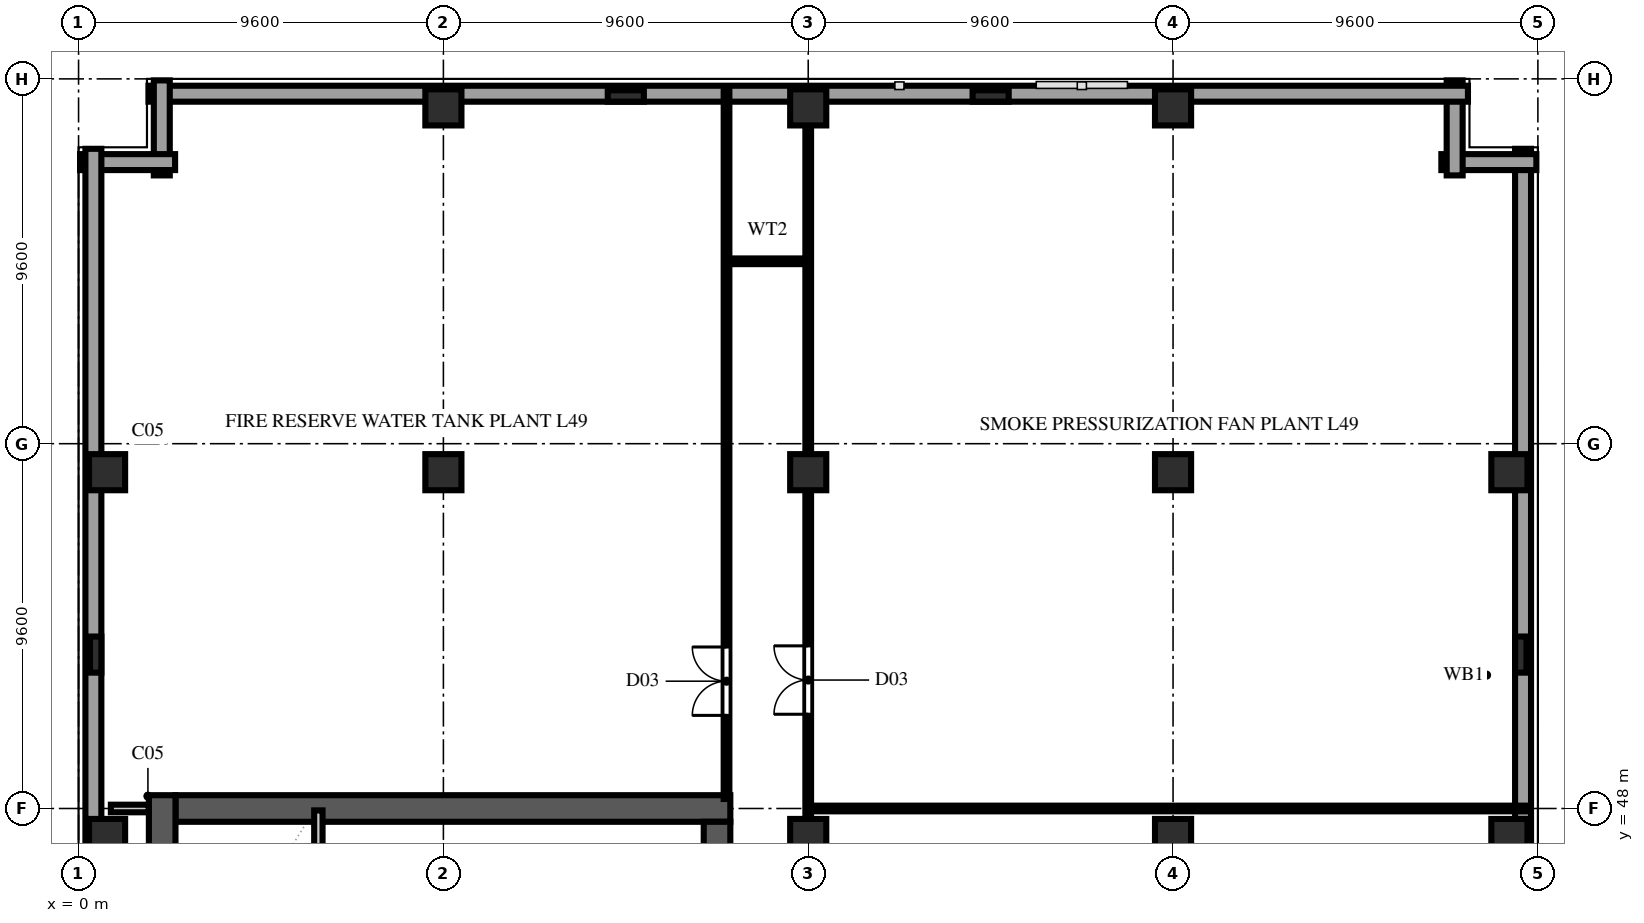
"""IFC4 building model, lengths in metres.
Left out: names, types, materials, properties, quantities, classifications, styles, units other than length and angle.
Written with IfcOpenShell. Run it as: python <this file> out.ifc"""

import sys

from ifc_helpers import new_model, si_unit, direction, frame, frame_2d, origin, origin_2d, place, context, subcontext, project, spatial, rectangle, extrude, element, fill, save


model = new_model("IFC4")
c1 = context("Model", 3, precision=1e-05, world=origin(), true_north=direction((0.0, 1.0)))
c2 = subcontext(c1, "Body", "Model", "MODEL_VIEW")
j1 = project(units=[si_unit("LENGTHUNIT", "METRE"), si_unit("PLANEANGLEUNIT", "RADIAN")], contexts=[c1])
p1 = place(None, origin())
s1 = spatial("IfcSite", under=j1, at=p1, CompositionType="ELEMENT")
p2 = place(p1, origin())
s2 = spatial("IfcBuilding", under=s1, at=p2, CompositionType="ELEMENT")
p3 = place(p2, frame((0.0, 0.0, 194.0)))
s3 = spatial("IfcBuildingStorey", under=s2, at=p3, CompositionType="ELEMENT", Elevation=194.0)
p4 = place(p3, frame((2.55, 48.0, 0.0), z_axis=(0.0, 0.0, 1.0), x_axis=(1.0, 0.0, 0.0)))
e1 = element("IfcWall", 1, at=p4, inside=s3, PredefinedType="SHEAR", context=c2, shape_type="SweptSolid", body=[
    extrude(rectangle(XDim=14.6, YDim=0.7, at=frame_2d((7.3, 0.0))), origin(), (0.0, 0.0, 1.0), 4.74),
])
p5 = place(p3, frame((2.2, 9.25, 0.0), z_axis=(0.0, 0.0, 1.0), x_axis=(0.0, 1.0, 0.0)))
e2 = element("IfcWall", 2, at=p5, inside=s3, PredefinedType="SHEAR", context=c2, shape_type="SweptSolid", body=[
    extrude(rectangle(XDim=39.1, YDim=0.7, at=frame_2d((19.55, 0.0))), origin(), (0.0, 0.0, 1.0), 4.74),
])
p6 = place(p3, frame((16.8, 36.4, 0.0), z_axis=(0.0, 0.0, 1.0), x_axis=(0.0, 1.0, 0.0)))
e3 = element("IfcWall", 3, at=p6, inside=s3, PredefinedType="SHEAR", context=c2, shape_type="SweptSolid", body=[
    extrude(rectangle(XDim=11.25, YDim=0.7, at=frame_2d((5.625, 0.0))), origin(), (0.0, 0.0, 1.0), 4.74),
])
p7 = place(p6, frame((9.2, 0.0, 0.0)))
e4 = element("IfcOpeningElement", 4, at=p7, cuts=e3, PredefinedType="OPENING", context=c2, shape_type="SweptSolid", body=[
    extrude(rectangle(XDim=0.95, YDim=2.15, at=frame_2d((0.475, 1.075))), frame((0.0, 0.362, 0.0), z_axis=(0.0, -1.0, 0.0), x_axis=(1.0, 0.0, 0.0)), (0.0, 0.0, 1.0), 0.724),
])
for number, where, z_axis, x_axis in (
    (5, (0.75, 47.25, 0.0), (0.0, 0.0, 1.0), (1.0, 0.0, 0.0)),
    (6, (0.75, 56.85, 0.0), (0.0, 0.0, 1.0), (1.0, 0.0, 0.0)),
    (7, (9.6, 56.85, 0.0), (0.0, 0.0, 1.0), (1.0, 0.0, 0.0)),
):
    element("IfcColumn", number, at=place(p3, frame(where, z_axis=z_axis, x_axis=x_axis)), inside=s3, PredefinedType="COLUMN", context=c2, shape_type="SweptSolid", body=[
        extrude(rectangle(XDim=0.95, YDim=0.95, at=origin_2d()), origin(), (0.0, 0.0, 1.0), 5.0),
    ])
p8 = place(p3, frame((9.6, 66.45, 0.0), z_axis=(0.0, 0.0, 1.0), x_axis=(1.0, 0.0, 0.0)))
e8 = element("IfcColumn", 8, at=p8, inside=s3, PredefinedType="COLUMN", context=c2, shape_type="SweptSolid", body=[
    extrude(rectangle(XDim=0.95, YDim=0.95, at=origin_2d()), origin(), (0.0, 0.0, 1.0), 4.7),
])
for number, where, z_axis, x_axis in (
    (9, (19.2, 47.25, 0.0), (0.0, 0.0, 1.0), (1.0, 0.0, 0.0)),
    (10, (19.2, 56.85, 0.0), (0.0, 0.0, 1.0), (1.0, 0.0, 0.0)),
):
    element("IfcColumn", number, at=place(p3, frame(where, z_axis=z_axis, x_axis=x_axis)), inside=s3, PredefinedType="COLUMN", context=c2, shape_type="SweptSolid", body=[
        extrude(rectangle(XDim=0.95, YDim=0.95, at=origin_2d()), origin(), (0.0, 0.0, 1.0), 5.0),
    ])
p9 = place(p3, frame((19.2, 66.45, 0.0), z_axis=(0.0, 0.0, 1.0), x_axis=(1.0, 0.0, 0.0)))
e11 = element("IfcColumn", 11, at=p9, inside=s3, PredefinedType="COLUMN", context=c2, shape_type="SweptSolid", body=[
    extrude(rectangle(XDim=0.95, YDim=0.95, at=origin_2d()), origin(), (0.0, 0.0, 1.0), 4.7),
])
for number, where, z_axis, x_axis in (
    (12, (28.8, 47.25, 0.0), (0.0, 0.0, 1.0), (1.0, 0.0, 0.0)),
    (13, (28.8, 56.85, 0.0), (0.0, 0.0, 1.0), (1.0, 0.0, 0.0)),
):
    element("IfcColumn", number, at=place(p3, frame(where, z_axis=z_axis, x_axis=x_axis)), inside=s3, PredefinedType="COLUMN", context=c2, shape_type="SweptSolid", body=[
        extrude(rectangle(XDim=0.95, YDim=0.95, at=origin_2d()), origin(), (0.0, 0.0, 1.0), 5.0),
    ])
p10 = place(p3, frame((28.8, 66.45, 0.0), z_axis=(0.0, 0.0, 1.0), x_axis=(1.0, 0.0, 0.0)))
e14 = element("IfcColumn", 14, at=p10, inside=s3, PredefinedType="COLUMN", context=c2, shape_type="SweptSolid", body=[
    extrude(rectangle(XDim=0.95, YDim=0.95, at=origin_2d()), origin(), (0.0, 0.0, 1.0), 4.7),
])
for number, where, z_axis, x_axis in (
    (15, (37.65, 47.25, 0.0), (0.0, 0.0, 1.0), (1.0, 0.0, 0.0)),
    (16, (37.65, 56.85, 0.0), (0.0, 0.0, 1.0), (1.0, 0.0, 0.0)),
):
    element("IfcColumn", number, at=place(p3, frame(where, z_axis=z_axis, x_axis=x_axis)), inside=s3, PredefinedType="COLUMN", context=c2, shape_type="SweptSolid", body=[
        extrude(rectangle(XDim=0.95, YDim=0.95, at=origin_2d()), origin(), (0.0, 0.0, 1.0), 5.0),
    ])
p11 = place(p3, frame((0.45, 52.05, 0.0), z_axis=(0.0, 0.0, 1.0), x_axis=(0.0, 1.0, 0.0)))
e17 = element("IfcColumn", 17, at=p11, inside=s3, PredefinedType="PILASTER", context=c2, shape_type="SweptSolid", body=[
    extrude(rectangle(XDim=0.95, YDim=0.3, at=origin_2d()), origin(), (0.0, 0.0, 1.0), 5.0),
])
for number, where, z_axis, x_axis in (
    (18, (14.4, 66.75, 0.0), (0.0, 0.0, 1.0), (1.0, 0.0, 0.0)),
    (19, (24.0, 66.75, 0.0), (0.0, 0.0, 1.0), (1.0, 0.0, 0.0)),
):
    element("IfcColumn", number, at=place(p3, frame(where, z_axis=z_axis, x_axis=x_axis)), inside=s3, PredefinedType="PILASTER", context=c2, shape_type="SweptSolid", body=[
        extrude(rectangle(XDim=0.95, YDim=0.3, at=origin_2d()), origin(), (0.0, 0.0, 1.0), 4.7),
    ])
p12 = place(p3, frame((37.95, 52.05, 0.0), z_axis=(0.0, 0.0, 1.0), x_axis=(0.0, 1.0, 0.0)))
e20 = element("IfcColumn", 20, at=p12, inside=s3, PredefinedType="PILASTER", context=c2, shape_type="SweptSolid", body=[
    extrude(rectangle(XDim=0.95, YDim=0.3, at=origin_2d()), origin(), (0.0, 0.0, 1.0), 5.0),
])
p13 = place(p3, frame((38.01, 37.66, 0.0), z_axis=(0.0, 0.0, 1.0), x_axis=(0.0, 1.0, 0.0)))
e21 = element("IfcWall", 21, at=p13, inside=s3, PredefinedType="SOLIDWALL", context=c2, shape_type="SweptSolid", body=[
    extrude(rectangle(XDim=27.7, YDim=0.42, at=frame_2d((13.85, 0.0))), origin(), (0.0, 0.0, 1.0), 4.74),
])
for number, where, z_axis, x_axis in (
    (22, (38.36, 65.01, 0.0), (0.0, 0.0, 1.0), (-1.0, 0.0, 0.0)),
    (23, (36.21, 64.66, 0.0), (0.0, 0.0, 1.0), (0.0, 1.0, 0.0)),
):
    element("IfcWall", number, at=place(p3, frame(where, z_axis=z_axis, x_axis=x_axis)), inside=s3, PredefinedType="SOLIDWALL", context=c2, shape_type="SweptSolid", body=[
        extrude(rectangle(XDim=2.5, YDim=0.42, at=frame_2d((1.25, 0.0))), origin(), (0.0, 0.0, 1.0), 4.7),
    ])
p14 = place(p3, frame((36.56, 66.81, 0.0), z_axis=(0.0, 0.0, 1.0), x_axis=(-1.0, 0.0, 0.0)))
e24 = element("IfcWall", 24, at=p14, inside=s3, PredefinedType="SOLIDWALL", context=c2, shape_type="SweptSolid", body=[
    extrude(rectangle(XDim=34.72, YDim=0.42, at=frame_2d((17.36, 0.0))), origin(), (0.0, 0.0, 1.0), 4.7),
])
for number, where, z_axis, x_axis in (
    (25, (2.19, 67.16, 0.0), (0.0, 0.0, 1.0), (0.0, -1.0, 0.0)),
    (26, (2.54, 65.01, 0.0), (0.0, 0.0, 1.0), (-1.0, 0.0, 0.0)),
):
    element("IfcWall", number, at=place(p3, frame(where, z_axis=z_axis, x_axis=x_axis)), inside=s3, PredefinedType="SOLIDWALL", context=c2, shape_type="SweptSolid", body=[
        extrude(rectangle(XDim=2.5, YDim=0.42, at=frame_2d((1.25, 0.0))), origin(), (0.0, 0.0, 1.0), 4.7),
    ])
p15 = place(p3, frame((0.39, 65.36, 0.0), z_axis=(0.0, 0.0, 1.0), x_axis=(0.0, -1.0, 0.0)))
e27 = element("IfcWall", 27, at=p15, inside=s3, PredefinedType="SOLIDWALL", context=c2, shape_type="SweptSolid", body=[
    extrude(rectangle(XDim=63.52, YDim=0.42, at=frame_2d((31.76, 0.0))), origin(), (0.0, 0.0, 1.0), 4.74),
])
p16 = place(p3, frame((6.31, 40.14, 0.0), z_axis=(0.0, 0.0, 1.0), x_axis=(0.0, 1.0, 0.0)))
e28 = element("IfcWall", 28, at=p16, inside=s3, PredefinedType="SOLIDWALL", context=c2, shape_type="SweptSolid", body=[
    extrude(rectangle(XDim=7.81, YDim=0.22, at=frame_2d((3.905, 0.0))), origin(), (0.0, 0.0, 1.0), 4.74),
])
p17 = place(p3, frame((0.85, 48.0, 0.0), z_axis=(0.0, 0.0, 1.0), x_axis=(1.0, 0.0, 0.0)))
e29 = element("IfcWall", 29, at=p17, inside=s3, PredefinedType="SOLIDWALL", context=c2, shape_type="SweptSolid", body=[
    extrude(rectangle(XDim=0.995, YDim=0.2, at=frame_2d((0.498, 0.0))), origin(), (0.0, 0.0, 1.0), 4.74),
])
p18 = place(p3, frame((17.05, 62.4, 0.0), z_axis=(0.0, 0.0, 1.0), x_axis=(1.0, 0.0, 0.0)))
e30 = element("IfcWall", 30, at=p18, inside=s3, PredefinedType="PARTITIONING", context=c2, shape_type="SweptSolid", body=[
    extrude(rectangle(XDim=2.15, YDim=0.15, at=frame_2d((1.075, 0.0))), origin(), (0.0, 0.0, 1.0), 4.7),
])
p19 = place(p3, frame((19.2, 48.0, 0.0), z_axis=(0.0, 0.0, 1.0), x_axis=(1.0, 0.0, 0.0)))
e31 = element("IfcWall", 31, at=p19, inside=s3, PredefinedType="PARTITIONING", context=c2, shape_type="SweptSolid", body=[
    extrude(rectangle(XDim=18.98, YDim=0.15, at=frame_2d((9.49, 0.0))), origin(), (0.0, 0.0, 1.0), 4.74),
])
p20 = place(p3, frame((19.2, 9.98, 0.0), z_axis=(0.0, 0.0, 1.0), x_axis=(0.0, 1.0, 0.0)))
e32 = element("IfcWall", 32, at=p20, inside=s3, PredefinedType="PARTITIONING", context=c2, shape_type="SweptSolid", body=[
    extrude(rectangle(XDim=46.87, YDim=0.15, at=frame_2d((23.435, 0.0))), origin(), (0.0, 0.0, 1.0), 3.967),
])
p21 = place(p20, frame((2.0, 0.0, 0.0)))
e33 = element("IfcOpeningElement", 33, at=p21, cuts=e32, PredefinedType="OPENING", context=c2, shape_type="SweptSolid", body=[
    extrude(rectangle(XDim=1.8, YDim=2.2, at=frame_2d((0.9, 1.1))), frame((0.0, 0.087, 0.0), z_axis=(0.0, -1.0, 0.0), x_axis=(1.0, 0.0, 0.0)), (0.0, 0.0, 1.0), 0.174),
])
p22 = place(p20, frame((12.0, 0.0, 0.0)))
e34 = element("IfcOpeningElement", 34, at=p22, cuts=e32, PredefinedType="OPENING", context=c2, shape_type="SweptSolid", body=[
    extrude(rectangle(XDim=1.8, YDim=2.2, at=frame_2d((0.9, 1.1))), frame((0.0, 0.087, 0.0), z_axis=(0.0, -1.0, 0.0), x_axis=(1.0, 0.0, 0.0)), (0.0, 0.0, 1.0), 0.174),
])
p23 = place(p20, frame((30.5, 0.0, 0.0)))
e35 = element("IfcOpeningElement", 35, at=p23, cuts=e32, PredefinedType="OPENING", context=c2, shape_type="SweptSolid", body=[
    extrude(rectangle(XDim=1.2, YDim=2.2, at=frame_2d((0.6, 1.1))), frame((0.0, 0.087, 0.0), z_axis=(0.0, -1.0, 0.0), x_axis=(1.0, 0.0, 0.0)), (0.0, 0.0, 1.0), 0.174),
])
p24 = place(p20, frame((40.5, 0.0, 0.0)))
e36 = element("IfcOpeningElement", 36, at=p24, cuts=e32, PredefinedType="OPENING", context=c2, shape_type="SweptSolid", body=[
    extrude(rectangle(XDim=1.8, YDim=2.2, at=frame_2d((0.9, 1.1))), frame((0.0, 0.087, 0.0), z_axis=(0.0, -1.0, 0.0), x_axis=(1.0, 0.0, 0.0)), (0.0, 0.0, 1.0), 0.174),
])
p25 = place(p3, frame((19.2, 56.85, 0.0), z_axis=(0.0, 0.0, 1.0), x_axis=(0.0, 1.0, 0.0)))
e37 = element("IfcWall", 37, at=p25, inside=s3, PredefinedType="PARTITIONING", context=c2, shape_type="SweptSolid", body=[
    extrude(rectangle(XDim=9.6, YDim=0.15, at=frame_2d((4.8, 0.0))), origin(), (0.0, 0.0, 1.0), 3.927),
])
p26 = place(p3, frame((19.2, 66.45, 0.0), z_axis=(0.0, 0.0, 1.0), x_axis=(0.0, 1.0, 0.0)))
e38 = element("IfcWall", 38, at=p26, inside=s3, PredefinedType="PARTITIONING", context=c2, shape_type="SweptSolid", body=[
    extrude(rectangle(XDim=0.53, YDim=0.15, at=frame_2d((0.265, 0.0))), origin(), (0.0, 0.0, 1.0), 4.74),
])
p27 = place(p3, frame((17.05, 48.25, 0.0), z_axis=(0.0, 0.0, 1.0), x_axis=(0.0, 1.0, 0.0)))
e39 = element("IfcWall", 39, at=p27, inside=s3, PredefinedType="PARTITIONING", context=c2, shape_type="SweptSolid", body=[
    extrude(rectangle(XDim=18.73, YDim=0.15, at=frame_2d((9.365, 0.0))), origin(), (0.0, 0.0, 1.0), 4.7),
])
p28 = place(p27, frame((2.2, 0.0, 0.0)))
e40 = element("IfcOpeningElement", 40, at=p28, cuts=e39, PredefinedType="OPENING", context=c2, shape_type="SweptSolid", body=[
    extrude(rectangle(XDim=1.8, YDim=2.2, at=frame_2d((0.9, 1.1))), frame((0.0, 0.087, 0.0), z_axis=(0.0, -1.0, 0.0), x_axis=(1.0, 0.0, 0.0)), (0.0, 0.0, 1.0), 0.174),
])
p29 = place(p24, origin())
e41 = element("IfcDoor", 41, at=p29, inside=s3, OperationType="DOUBLE_DOOR_SINGLE_SWING", PredefinedType="DOOR", context=c2, shape_type="SweptSolid", body=[
    extrude(rectangle(XDim=1.8, YDim=2.2, at=frame_2d((0.9, 1.1))), frame((0.0, 0.025, 0.0), z_axis=(0.0, -1.0, 0.0), x_axis=(1.0, 0.0, 0.0)), (0.0, 0.0, 1.0), 0.05),
])
fill(e36, e41)
p30 = place(p28, origin())
e42 = element("IfcDoor", 42, at=p30, inside=s3, OperationType="DOUBLE_DOOR_SINGLE_SWING", PredefinedType="DOOR", context=c2, shape_type="SweptSolid", body=[
    extrude(rectangle(XDim=1.8, YDim=2.2, at=frame_2d((0.9, 1.1))), frame((0.0, 0.025, 0.0), z_axis=(0.0, -1.0, 0.0), x_axis=(1.0, 0.0, 0.0)), (0.0, 0.0, 1.0), 0.05),
])
fill(e40, e42)
save(model, sys.argv[1])
